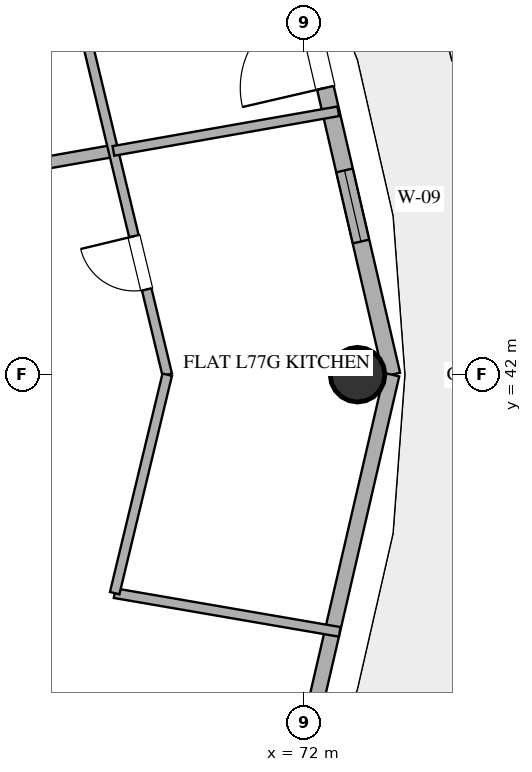
"""IFC4 building model, lengths in metres.
Left out: names, types, materials, properties, quantities, classifications, styles, units other than length and angle.
Written with IfcOpenShell. Run it as: python <this file> out.ifc"""

import sys

from ifc_helpers import new_model, si_unit, direction, frame, frame_2d, origin, origin_2d, place, context, subcontext, project, spatial, rectangle, hollow_circle, extrude, element, fill, save


model = new_model("IFC4")
c1 = context("Model", 3, precision=1e-05, world=origin(), true_north=direction((0.0, 1.0)))
c2 = subcontext(c1, "Body", "Model", "MODEL_VIEW")
j1 = project(units=[si_unit("LENGTHUNIT", "METRE"), si_unit("PLANEANGLEUNIT", "RADIAN")], contexts=[c1])
p1 = place(None, origin())
s1 = spatial("IfcSite", under=j1, at=p1, CompositionType="ELEMENT")
p2 = place(p1, origin())
s2 = spatial("IfcBuilding", under=s1, at=p2, CompositionType="ELEMENT")
p3 = place(p2, frame((0.0, 0.0, 298.2)))
s3 = spatial("IfcBuildingStorey", under=s2, at=p3, CompositionType="ELEMENT", Elevation=298.2)
p4 = place(p3, frame((72.883, 42.0, 0.0), z_axis=(0.0, 0.0, 1.0), x_axis=(1.0, 0.0, 0.0)))
e1 = element("IfcColumn", 1, at=p4, inside=s3, PredefinedType="COLUMN", context=c2, shape_type="SweptSolid", body=[
    extrude(hollow_circle(Radius=0.45, WallThickness=0.025, at=origin_2d()), origin(), (0.0, 0.0, 1.0), 3.37),
])
p5 = place(p3, frame((73.447, 42.0, 0.0), z_axis=(0.0, 0.0, 1.0), x_axis=(-0.225635078214, 0.974211892495, 0.0)))
e2 = element("IfcWall", 2, at=p5, inside=s3, PredefinedType="SOLIDWALL", context=c2, shape_type="SweptSolid", body=[
    extrude(rectangle(XDim=7.77, YDim=0.28, at=frame_2d((3.885, 0.0))), origin(), (0.0, 0.0, 1.0), 3.37),
])
p6 = place(p5, frame((2.248, 0.0, 0.85)))
e3 = element("IfcOpeningElement", 3, at=p6, cuts=e2, PredefinedType="OPENING", context=c2, shape_type="SweptSolid", body=[
    extrude(rectangle(XDim=1.2, YDim=1.8, at=frame_2d((0.6, 0.9))), frame((0.0, 0.15, 0.0), z_axis=(0.0, -1.0, 0.0), x_axis=(1.0, 0.0, 0.0)), (0.0, 0.0, 1.0), 0.3),
])
p7 = place(p5, frame((4.842, 0.0, 0.0)))
e4 = element("IfcOpeningElement", 4, at=p7, cuts=e2, PredefinedType="OPENING", context=c2, shape_type="SweptSolid", body=[
    extrude(rectangle(XDim=1.4, YDim=2.2, at=frame_2d((0.7, 1.1))), frame((0.0, 0.15, 0.0), z_axis=(0.0, -1.0, 0.0), x_axis=(1.0, 0.0, 0.0)), (0.0, 0.0, 1.0), 0.3),
])
p8 = place(p3, frame((71.694, 34.43, 0.0), z_axis=(0.0, 0.0, 1.0), x_axis=(0.225635078214, 0.974211892495, 0.0)))
e5 = element("IfcWall", 5, at=p8, inside=s3, PredefinedType="SOLIDWALL", context=c2, shape_type="SweptSolid", body=[
    extrude(rectangle(XDim=7.77, YDim=0.25, at=frame_2d((3.885, 0.0))), origin(), (0.0, 0.0, 1.0), 3.37),
])
p9 = place(p3, frame((68.868, 45.68, 0.0), z_axis=(0.0, 0.0, 1.0), x_axis=(-0.984803753522, -0.173670858377, 0.0)))
e6 = element("IfcWall", 6, at=p9, inside=s3, PredefinedType="PARTITIONING", context=c2, shape_type="SweptSolid", body=[
    extrude(rectangle(XDim=7.787, YDim=0.2, at=frame_2d((3.893, 0.0))), origin(), (0.0, 0.0, 1.0), 2.73),
])
p10 = place(p3, frame((69.753, 42.0, 0.0), z_axis=(0.0, 0.0, 1.0), x_axis=(-0.233901777694, 0.972260231827, 0.0)))
e7 = element("IfcWall", 7, at=p10, inside=s3, PredefinedType="PLUMBINGWALL", context=c2, shape_type="SweptSolid", body=[
    extrude(rectangle(XDim=6.408, YDim=0.16, at=frame_2d((3.204, 0.0))), origin(), (0.0, 0.0, 1.0), 2.73),
])
p11 = place(p10, frame((1.442, 0.0, 0.0)))
e8 = element("IfcOpeningElement", 8, at=p11, cuts=e7, PredefinedType="OPENING", context=c2, shape_type="SweptSolid", body=[
    extrude(rectangle(XDim=0.9, YDim=2.1, at=frame_2d((0.45, 1.05))), frame((0.0, 0.09, 0.0), z_axis=(0.0, -1.0, 0.0), x_axis=(1.0, 0.0, 0.0)), (0.0, 0.0, 1.0), 0.18),
])
p12 = place(p3, frame((72.59, 37.77, 0.0), z_axis=(0.0, 0.0, 1.0), x_axis=(-0.985535831404, 0.169467179769, 0.0)))
e9 = element("IfcWall", 9, at=p12, inside=s3, PredefinedType="PLUMBINGWALL", context=c2, shape_type="SweptSolid", body=[
    extrude(rectangle(XDim=3.756, YDim=0.16, at=frame_2d((1.878, 0.0))), origin(), (0.0, 0.0, 1.0), 2.73),
])
p13 = place(p3, frame((68.868, 45.68, 0.0), z_axis=(0.0, 0.0, 1.0), x_axis=(0.984809725457, 0.173636991003, 0.0)))
e10 = element("IfcWall", 10, at=p13, inside=s3, PredefinedType="PLUMBINGWALL", context=c2, shape_type="SweptSolid", body=[
    extrude(rectangle(XDim=3.756, YDim=0.16, at=frame_2d((1.878, 0.0))), origin(), (0.0, 0.0, 1.0), 2.73),
])
p14 = place(p3, frame((68.889, 38.407, 0.0), z_axis=(0.0, 0.0, 1.0), x_axis=(0.233915080076, 0.972257031506, 0.0)))
e11 = element("IfcWall", 11, at=p14, inside=s3, PredefinedType="PLUMBINGWALL", context=c2, shape_type="SweptSolid", body=[
    extrude(rectangle(XDim=3.696, YDim=0.16, at=frame_2d((1.848, 0.0))), origin(), (0.0, 0.0, 1.0), 2.73),
])
p15 = place(p6, origin())
e12 = element("IfcWindow", 12, at=p15, inside=s3, PartitioningType="SINGLE_PANEL", PredefinedType="WINDOW", context=c2, shape_type="SweptSolid", body=[
    extrude(rectangle(XDim=1.2, YDim=1.8, at=frame_2d((0.6, 0.9))), frame((0.0, 0.03, 0.0), z_axis=(0.0, -1.0, 0.0), x_axis=(1.0, 0.0, 0.0)), (0.0, 0.0, 1.0), 0.06),
])
fill(e3, e12)
p16 = place(p7, origin())
e13 = element("IfcDoor", 13, at=p16, inside=s3, OperationType="SINGLE_SWING_LEFT", PredefinedType="DOOR", context=c2, shape_type="SweptSolid", body=[
    extrude(rectangle(XDim=1.4, YDim=2.2, at=frame_2d((0.7, 1.1))), frame((0.0, 0.025, 0.0), z_axis=(0.0, -1.0, 0.0), x_axis=(1.0, 0.0, 0.0)), (0.0, 0.0, 1.0), 0.05),
])
fill(e4, e13)
p17 = place(p11, origin())
e14 = element("IfcDoor", 14, at=p17, inside=s3, OperationType="SINGLE_SWING_RIGHT", PredefinedType="DOOR", context=c2, shape_type="SweptSolid", body=[
    extrude(rectangle(XDim=0.9, YDim=2.1, at=frame_2d((0.45, 1.05))), frame((0.0, 0.025, 0.0), z_axis=(0.0, -1.0, 0.0), x_axis=(1.0, 0.0, 0.0)), (0.0, 0.0, 1.0), 0.05),
])
fill(e8, e14)
save(model, sys.argv[1])
